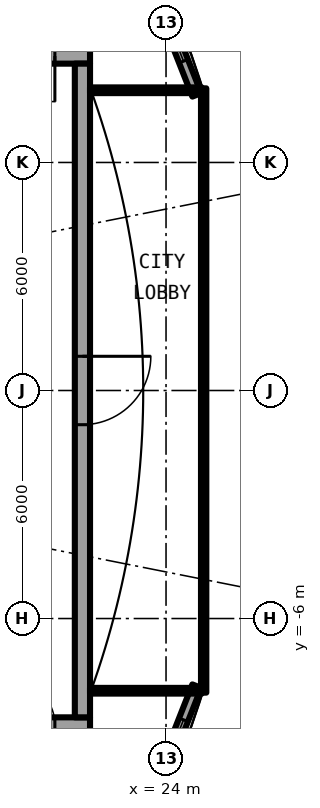
"""IFC4 building model, lengths in metres.
Left out: names, types, materials, properties, quantities, classifications, styles, units other than length and angle.
Written with IfcOpenShell. Run it as: python <this file> out.ifc"""

import sys

from ifc_helpers import new_model, si_unit, direction, frame, frame_2d, origin, place, context, subcontext, project, spatial, rectangle, extrude, element, fill, save


model = new_model("IFC4")
c1 = context("Model", 3, precision=1e-05, world=origin(), true_north=direction((0.0, 1.0)))
c2 = subcontext(c1, "Body", "Model", "MODEL_VIEW")
j1 = project(units=[si_unit("LENGTHUNIT", "METRE"), si_unit("PLANEANGLEUNIT", "RADIAN")], contexts=[c1])
p1 = place(None, origin())
s1 = spatial("IfcSite", under=j1, at=p1, CompositionType="ELEMENT")
p2 = place(p1, origin())
s2 = spatial("IfcBuilding", under=s1, at=p2, CompositionType="ELEMENT")
p3 = place(p2, frame((0.0, 0.0, 246.25)))
s3 = spatial("IfcBuildingStorey", under=s2, at=p3, CompositionType="ELEMENT", Elevation=246.25)
p4 = place(p3, frame((24.809, 7.779, 0.0), z_axis=(0.0, 0.0, 1.0), x_axis=(-0.366351636034, 0.930476479432, 0.0)))
e1 = element("IfcWall", 1, at=p4, inside=s3, PredefinedType="SOLIDWALL", context=c2, shape_type="SweptSolid", body=[
    extrude(rectangle(XDim=3.705, YDim=0.25, at=frame_2d((1.852, 0.0))), origin(), (0.0, 0.0, 1.0), 2.7),
])
p5 = place(p4, frame((0.952, 0.0, 0.3)))
e2 = element("IfcOpeningElement", 2, at=p5, cuts=e1, PredefinedType="OPENING", context=c2, shape_type="SweptSolid", body=[
    extrude(rectangle(XDim=1.8, YDim=2.1, at=frame_2d((0.9, 1.05))), frame((0.0, 0.135, 0.0), z_axis=(0.0, -1.0, 0.0), x_axis=(1.0, 0.0, 0.0)), (0.0, 0.0, 1.0), 0.27),
])
p6 = place(p3, frame((23.452, -11.226, 0.0), z_axis=(0.0, 0.0, 1.0), x_axis=(0.366351636034, 0.930476479432, 0.0)))
e3 = element("IfcWall", 3, at=p6, inside=s3, PredefinedType="SOLIDWALL", context=c2, shape_type="SweptSolid", body=[
    extrude(rectangle(XDim=3.705, YDim=0.25, at=frame_2d((1.852, 0.0))), origin(), (0.0, 0.0, 1.0), 2.7),
])
p7 = place(p6, frame((0.952, 0.0, 0.3)))
e4 = element("IfcOpeningElement", 4, at=p7, cuts=e3, PredefinedType="OPENING", context=c2, shape_type="SweptSolid", body=[
    extrude(rectangle(XDim=1.8, YDim=2.1, at=frame_2d((0.9, 1.05))), frame((0.0, 0.135, 0.0), z_axis=(0.0, -1.0, 0.0), x_axis=(1.0, 0.0, 0.0)), (0.0, 0.0, 1.0), 0.27),
])
p8 = place(p3, frame((22.0, 8.8, 0.0), z_axis=(0.0, 0.0, 1.0), x_axis=(-1.0, 0.0, 0.0)))
e5 = element("IfcWall", 5, at=p8, inside=s3, PredefinedType="SHEAR", context=c2, shape_type="SweptSolid", body=[
    extrude(rectangle(XDim=13.4, YDim=0.4, at=frame_2d((6.7, 0.0))), origin(), (0.0, 0.0, 1.0), 3.05),
])
p9 = place(p8, frame((0.925, 0.0, 0.0)))
e6 = element("IfcOpeningElement", 6, at=p9, cuts=e5, PredefinedType="OPENING", context=c2, shape_type="SweptSolid", body=[
    extrude(rectangle(XDim=1.2, YDim=2.3, at=frame_2d((0.6, 1.15))), frame((0.0, 0.21, 0.0), z_axis=(0.0, -1.0, 0.0), x_axis=(1.0, 0.0, 0.0)), (0.0, 0.0, 1.0), 0.42),
])
p10 = place(p3, frame((8.6, -8.8, 0.0), z_axis=(0.0, 0.0, 1.0), x_axis=(1.0, 0.0, 0.0)))
e7 = element("IfcWall", 7, at=p10, inside=s3, PredefinedType="SHEAR", context=c2, shape_type="SweptSolid", body=[
    extrude(rectangle(XDim=13.4, YDim=0.4, at=frame_2d((6.7, 0.0))), origin(), (0.0, 0.0, 1.0), 3.05),
])
p11 = place(p10, frame((11.275, 0.0, 0.0)))
e8 = element("IfcOpeningElement", 8, at=p11, cuts=e7, PredefinedType="OPENING", context=c2, shape_type="SweptSolid", body=[
    extrude(rectangle(XDim=1.2, YDim=2.3, at=frame_2d((0.6, 1.15))), frame((0.0, 0.21, 0.0), z_axis=(0.0, -1.0, 0.0), x_axis=(1.0, 0.0, 0.0)), (0.0, 0.0, 1.0), 0.42),
])
p12 = place(p3, frame((21.8, 8.6, 0.0), z_axis=(0.0, 0.0, 1.0), x_axis=(0.0, -1.0, 0.0)))
e9 = element("IfcWall", 9, at=p12, inside=s3, PredefinedType="SHEAR", context=c2, shape_type="SweptSolid", body=[
    extrude(rectangle(XDim=17.2, YDim=0.4, at=frame_2d((8.6, 0.0))), origin(), (0.0, 0.0, 1.0), 3.05),
])
p13 = place(p12, frame((7.7, 0.0, 0.0)))
e10 = element("IfcOpeningElement", 10, at=p13, cuts=e9, PredefinedType="OPENING", context=c2, shape_type="SweptSolid", body=[
    extrude(rectangle(XDim=1.8, YDim=2.3, at=frame_2d((0.9, 1.15))), frame((0.0, 0.21, 0.0), z_axis=(0.0, -1.0, 0.0), x_axis=(1.0, 0.0, 0.0)), (0.0, 0.0, 1.0), 0.42),
])
for number, where, z_axis, x_axis in (
    (11, (22.0, -7.9, 0.0), (0.0, 0.0, 1.0), (1.0, 0.0, 0.0)),
    (12, (22.0, 7.9, 0.0), (0.0, 0.0, 1.0), (1.0, 0.0, 0.0)),
):
    element("IfcWall", number, at=place(p3, frame(where, z_axis=z_axis, x_axis=x_axis)), inside=s3, PredefinedType="PARTITIONING", context=c2, shape_type="SweptSolid", body=[
        extrude(rectangle(XDim=2.94, YDim=0.15, at=frame_2d((1.47, 0.0))), origin(), (0.0, 0.0, 1.0), 2.7),
    ])
p14 = place(p3, frame((25.0, -7.95, 0.0), z_axis=(0.0, 0.0, 1.0), x_axis=(0.0, 1.0, 0.0)))
e13 = element("IfcWall", 13, at=p14, inside=s3, PredefinedType="PARTITIONING", context=c2, shape_type="SweptSolid", body=[
    extrude(rectangle(XDim=15.9, YDim=0.12, at=frame_2d((7.95, 0.0))), origin(), (0.0, 0.0, 1.0), 2.7),
])
p15 = place(p14, frame((0.95, 0.0, 0.1)))
e14 = element("IfcOpeningElement", 14, at=p15, cuts=e13, PredefinedType="OPENING", context=c2, shape_type="SweptSolid", body=[
    extrude(rectangle(XDim=14.0, YDim=2.35, at=frame_2d((7.0, 1.175))), frame((0.0, 0.07, 0.0), z_axis=(0.0, -1.0, 0.0), x_axis=(1.0, 0.0, 0.0)), (0.0, 0.0, 1.0), 0.14),
])
p16 = place(p5, origin())
e15 = element("IfcWindow", 15, at=p16, inside=s3, PartitioningType="SINGLE_PANEL", PredefinedType="WINDOW", context=c2, shape_type="SweptSolid", body=[
    extrude(rectangle(XDim=1.8, YDim=2.1, at=frame_2d((0.9, 1.05))), frame((0.0, 0.03, 0.0), z_axis=(0.0, -1.0, 0.0), x_axis=(1.0, 0.0, 0.0)), (0.0, 0.0, 1.0), 0.06),
])
fill(e2, e15)
p17 = place(p7, origin())
e16 = element("IfcWindow", 16, at=p17, inside=s3, PartitioningType="SINGLE_PANEL", PredefinedType="WINDOW", context=c2, shape_type="SweptSolid", body=[
    extrude(rectangle(XDim=1.8, YDim=2.1, at=frame_2d((0.9, 1.05))), frame((0.0, 0.03, 0.0), z_axis=(0.0, -1.0, 0.0), x_axis=(1.0, 0.0, 0.0)), (0.0, 0.0, 1.0), 0.06),
])
fill(e4, e16)
p18 = place(p9, origin())
e17 = element("IfcDoor", 17, at=p18, inside=s3, OperationType="SINGLE_SWING_RIGHT", PredefinedType="DOOR", context=c2, shape_type="SweptSolid", body=[
    extrude(rectangle(XDim=1.2, YDim=2.3, at=frame_2d((0.6, 1.15))), frame((0.0, 0.025, 0.0), z_axis=(0.0, -1.0, 0.0), x_axis=(1.0, 0.0, 0.0)), (0.0, 0.0, 1.0), 0.05),
])
fill(e6, e17)
p19 = place(p11, origin())
e18 = element("IfcDoor", 18, at=p19, inside=s3, OperationType="SINGLE_SWING_LEFT", PredefinedType="DOOR", context=c2, shape_type="SweptSolid", body=[
    extrude(rectangle(XDim=1.2, YDim=2.3, at=frame_2d((0.6, 1.15))), frame((0.0, 0.025, 0.0), z_axis=(0.0, -1.0, 0.0), x_axis=(1.0, 0.0, 0.0)), (0.0, 0.0, 1.0), 0.05),
])
fill(e8, e18)
p20 = place(p13, origin())
e19 = element("IfcDoor", 19, at=p20, inside=s3, OperationType="SINGLE_SWING_LEFT", PredefinedType="DOOR", context=c2, shape_type="SweptSolid", body=[
    extrude(rectangle(XDim=1.8, YDim=2.3, at=frame_2d((0.9, 1.15))), frame((0.0, 0.025, 0.0), z_axis=(0.0, -1.0, 0.0), x_axis=(1.0, 0.0, 0.0)), (0.0, 0.0, 1.0), 0.05),
])
fill(e10, e19)
p21 = place(p15, origin())
e20 = element("IfcWindow", 20, at=p21, inside=s3, PartitioningType="SINGLE_PANEL", PredefinedType="WINDOW", context=c2, shape_type="SweptSolid", body=[
    extrude(rectangle(XDim=14.0, YDim=2.35, at=frame_2d((7.0, 1.175))), frame((0.0, 0.03, 0.0), z_axis=(0.0, -1.0, 0.0), x_axis=(1.0, 0.0, 0.0)), (0.0, 0.0, 1.0), 0.06),
])
fill(e14, e20)
save(model, sys.argv[1])
